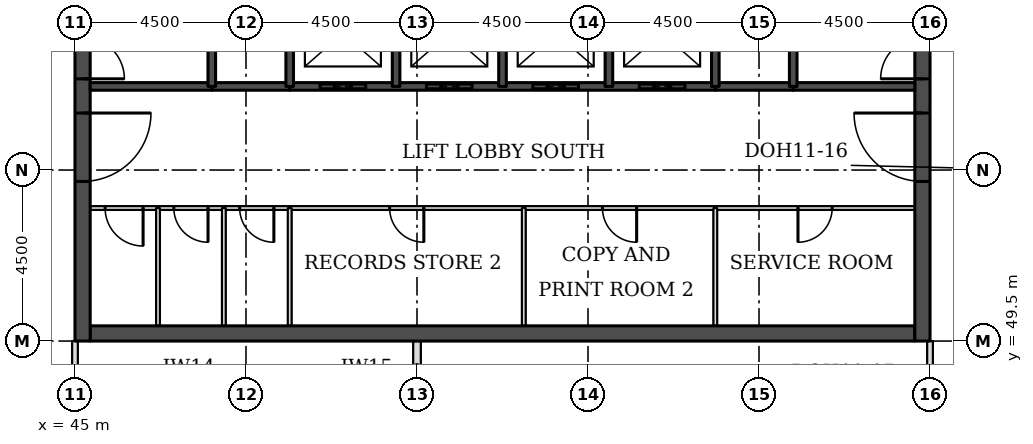
"""IFC4 building model, lengths in metres.
Left out: names, types, materials, properties, quantities, classifications, styles, units other than length and angle.
Written with IfcOpenShell. Run it as: python <this file> out.ifc"""

import sys

from ifc_helpers import new_model, si_unit, direction, frame, frame_2d, origin, place, context, subcontext, project, spatial, rectangle, extrude, element, fill, save


model = new_model("IFC4")
c1 = context("Model", 3, precision=1e-05, world=origin(), true_north=direction((0.0, 1.0)))
c2 = subcontext(c1, "Body", "Model", "MODEL_VIEW")
j1 = project(units=[si_unit("LENGTHUNIT", "METRE"), si_unit("PLANEANGLEUNIT", "RADIAN")], contexts=[c1])
p1 = place(None, origin())
s1 = spatial("IfcSite", under=j1, at=p1, CompositionType="ELEMENT")
p2 = place(p1, origin())
s2 = spatial("IfcBuilding", under=s1, at=p2, CompositionType="ELEMENT")
p3 = place(p2, frame((0.0, 0.0, 237.8)))
s3 = spatial("IfcBuildingStorey", under=s2, at=p3, CompositionType="ELEMENT", Elevation=237.8)
p4 = place(p3, frame((45.4, 49.7, 0.0), z_axis=(0.0, 0.0, 1.0), x_axis=(1.0, 0.0, 0.0)))
e1 = element("IfcWall", 1, at=p4, inside=s3, PredefinedType="SHEAR", context=c2, shape_type="SweptSolid", body=[
    extrude(rectangle(XDim=21.7, YDim=0.4, at=frame_2d((10.85, 0.0))), origin(), (0.0, 0.0, 1.0), 3.7),
])
p5 = place(p3, frame((45.2, 49.5, 0.0), z_axis=(0.0, 0.0, 1.0), x_axis=(0.0, 1.0, 0.0)))
e2 = element("IfcWall", 2, at=p5, inside=s3, PredefinedType="SHEAR", context=c2, shape_type="SweptSolid", body=[
    extrude(rectangle(XDim=22.5, YDim=0.4, at=frame_2d((11.25, 0.0))), origin(), (0.0, 0.0, 1.0), 3.7),
])
p6 = place(p5, frame((4.2, 0.0, 0.0)))
e3 = element("IfcOpeningElement", 3, at=p6, cuts=e2, PredefinedType="OPENING", context=c2, shape_type="SweptSolid", body=[
    extrude(rectangle(XDim=1.8, YDim=2.1, at=frame_2d((0.9, 1.05))), frame((0.0, 0.21, 0.0), z_axis=(0.0, -1.0, 0.0), x_axis=(1.0, 0.0, 0.0)), (0.0, 0.0, 1.0), 0.42),
])
p7 = place(p5, frame((6.9, 0.0, 0.0)))
e4 = element("IfcOpeningElement", 4, at=p7, cuts=e2, PredefinedType="OPENING", context=c2, shape_type="SweptSolid", body=[
    extrude(rectangle(XDim=1.1, YDim=2.1, at=frame_2d((0.55, 1.05))), frame((0.0, 0.21, 0.0), z_axis=(0.0, -1.0, 0.0), x_axis=(1.0, 0.0, 0.0)), (0.0, 0.0, 1.0), 0.42),
])
p8 = place(p5, frame((13.6, 0.0, 0.0)))
e5 = element("IfcOpeningElement", 5, at=p8, cuts=e2, PredefinedType="OPENING", context=c2, shape_type="SweptSolid", body=[
    extrude(rectangle(XDim=1.1, YDim=2.1, at=frame_2d((0.55, 1.05))), frame((0.0, 0.21, 0.0), z_axis=(0.0, -1.0, 0.0), x_axis=(1.0, 0.0, 0.0)), (0.0, 0.0, 1.0), 0.42),
])
p9 = place(p5, frame((16.5, 0.0, 0.0)))
e6 = element("IfcOpeningElement", 6, at=p9, cuts=e2, PredefinedType="OPENING", context=c2, shape_type="SweptSolid", body=[
    extrude(rectangle(XDim=1.8, YDim=2.1, at=frame_2d((0.9, 1.05))), frame((0.0, 0.21, 0.0), z_axis=(0.0, -1.0, 0.0), x_axis=(1.0, 0.0, 0.0)), (0.0, 0.0, 1.0), 0.42),
])
p10 = place(p3, frame((67.3, 49.5, 0.0), z_axis=(0.0, 0.0, 1.0), x_axis=(0.0, 1.0, 0.0)))
e7 = element("IfcWall", 7, at=p10, inside=s3, PredefinedType="SHEAR", context=c2, shape_type="SweptSolid", body=[
    extrude(rectangle(XDim=22.5, YDim=0.4, at=frame_2d((11.25, 0.0))), origin(), (0.0, 0.0, 1.0), 3.7),
])
p11 = place(p10, frame((4.2, 0.0, 0.0)))
e8 = element("IfcOpeningElement", 8, at=p11, cuts=e7, PredefinedType="OPENING", context=c2, shape_type="SweptSolid", body=[
    extrude(rectangle(XDim=1.8, YDim=2.1, at=frame_2d((0.9, 1.05))), frame((0.0, 0.21, 0.0), z_axis=(0.0, -1.0, 0.0), x_axis=(1.0, 0.0, 0.0)), (0.0, 0.0, 1.0), 0.42),
])
p12 = place(p10, frame((6.9, 0.0, 0.0)))
e9 = element("IfcOpeningElement", 9, at=p12, cuts=e7, PredefinedType="OPENING", context=c2, shape_type="SweptSolid", body=[
    extrude(rectangle(XDim=1.1, YDim=2.1, at=frame_2d((0.55, 1.05))), frame((0.0, 0.21, 0.0), z_axis=(0.0, -1.0, 0.0), x_axis=(1.0, 0.0, 0.0)), (0.0, 0.0, 1.0), 0.42),
])
p13 = place(p10, frame((13.6, 0.0, 0.0)))
e10 = element("IfcOpeningElement", 10, at=p13, cuts=e7, PredefinedType="OPENING", context=c2, shape_type="SweptSolid", body=[
    extrude(rectangle(XDim=1.1, YDim=2.1, at=frame_2d((0.55, 1.05))), frame((0.0, 0.21, 0.0), z_axis=(0.0, -1.0, 0.0), x_axis=(1.0, 0.0, 0.0)), (0.0, 0.0, 1.0), 0.42),
])
p14 = place(p10, frame((16.5, 0.0, 0.0)))
e11 = element("IfcOpeningElement", 11, at=p14, cuts=e7, PredefinedType="OPENING", context=c2, shape_type="SweptSolid", body=[
    extrude(rectangle(XDim=1.8, YDim=2.1, at=frame_2d((0.9, 1.05))), frame((0.0, 0.21, 0.0), z_axis=(0.0, -1.0, 0.0), x_axis=(1.0, 0.0, 0.0)), (0.0, 0.0, 1.0), 0.42),
])
p15 = place(p3, frame((54.0, 46.5, 0.0), z_axis=(0.0, 0.0, 1.0), x_axis=(0.0, 1.0, 0.0)))
e12 = element("IfcWall", 12, at=p15, inside=s3, PredefinedType="PARTITIONING", context=c2, shape_type="SweptSolid", body=[
    extrude(rectangle(XDim=3.0, YDim=0.2, at=frame_2d((1.5, 0.0))), origin(), (0.0, 0.0, 1.0), 3.55),
])
for number, where, z_axis, x_axis in (
    (13, (45.0, 48.0, 0.0), (0.0, 0.0, 1.0), (0.0, 1.0, 0.0)),
    (14, (67.5, 48.0, 0.0), (0.0, 0.0, 1.0), (0.0, 1.0, 0.0)),
):
    element("IfcWall", number, at=place(p3, frame(where, z_axis=z_axis, x_axis=x_axis)), inside=s3, PredefinedType="PARTITIONING", context=c2, shape_type="SweptSolid", body=[
        extrude(rectangle(XDim=1.5, YDim=0.15, at=frame_2d((0.75, 0.0))), origin(), (0.0, 0.0, 1.0), 3.022),
    ])
p16 = place(p3, frame((45.4, 53.0, 0.0), z_axis=(0.0, 0.0, 1.0), x_axis=(1.0, 0.0, 0.0)))
e15 = element("IfcWall", 15, at=p16, inside=s3, PredefinedType="PARTITIONING", context=c2, shape_type="SweptSolid", body=[
    extrude(rectangle(XDim=21.7, YDim=0.1, at=frame_2d((10.85, 0.0))), origin(), (0.0, 0.0, 1.0), 3.55),
])
p17 = place(p16, frame((18.625, 0.0, 0.0)))
e16 = element("IfcOpeningElement", 16, at=p17, cuts=e15, PredefinedType="OPENING", context=c2, shape_type="SweptSolid", body=[
    extrude(rectangle(XDim=0.9, YDim=2.1, at=frame_2d((0.45, 1.05))), frame((0.0, 0.06, 0.0), z_axis=(0.0, -1.0, 0.0), x_axis=(1.0, 0.0, 0.0)), (0.0, 0.0, 1.0), 0.12),
])
p18 = place(p16, frame((0.393, 0.0, 0.0)))
e17 = element("IfcOpeningElement", 17, at=p18, cuts=e15, PredefinedType="OPENING", context=c2, shape_type="SweptSolid", body=[
    extrude(rectangle(XDim=1.0, YDim=2.1, at=frame_2d((0.5, 1.05))), frame((0.0, 0.06, 0.0), z_axis=(0.0, -1.0, 0.0), x_axis=(1.0, 0.0, 0.0)), (0.0, 0.0, 1.0), 0.12),
])
p19 = place(p16, frame((2.201, 0.0, 0.0)))
e18 = element("IfcOpeningElement", 18, at=p19, cuts=e15, PredefinedType="OPENING", context=c2, shape_type="SweptSolid", body=[
    extrude(rectangle(XDim=0.9, YDim=2.1, at=frame_2d((0.45, 1.05))), frame((0.0, 0.06, 0.0), z_axis=(0.0, -1.0, 0.0), x_axis=(1.0, 0.0, 0.0)), (0.0, 0.0, 1.0), 0.12),
])
p20 = place(p16, frame((3.934, 0.0, 0.0)))
e19 = element("IfcOpeningElement", 19, at=p20, cuts=e15, PredefinedType="OPENING", context=c2, shape_type="SweptSolid", body=[
    extrude(rectangle(XDim=0.9, YDim=2.1, at=frame_2d((0.45, 1.05))), frame((0.0, 0.06, 0.0), z_axis=(0.0, -1.0, 0.0), x_axis=(1.0, 0.0, 0.0)), (0.0, 0.0, 1.0), 0.12),
])
p21 = place(p16, frame((7.88, 0.0, 0.0)))
e20 = element("IfcOpeningElement", 20, at=p21, cuts=e15, PredefinedType="OPENING", context=c2, shape_type="SweptSolid", body=[
    extrude(rectangle(XDim=0.9, YDim=2.1, at=frame_2d((0.45, 1.05))), frame((0.0, 0.06, 0.0), z_axis=(0.0, -1.0, 0.0), x_axis=(1.0, 0.0, 0.0)), (0.0, 0.0, 1.0), 0.12),
])
p22 = place(p16, frame((13.48, 0.0, 0.0)))
e21 = element("IfcOpeningElement", 21, at=p22, cuts=e15, PredefinedType="OPENING", context=c2, shape_type="SweptSolid", body=[
    extrude(rectangle(XDim=0.9, YDim=2.1, at=frame_2d((0.45, 1.05))), frame((0.0, 0.06, 0.0), z_axis=(0.0, -1.0, 0.0), x_axis=(1.0, 0.0, 0.0)), (0.0, 0.0, 1.0), 0.12),
])
for number, where, z_axis, x_axis in (
    (22, (48.6, 56.2, 0.0), (0.0, 0.0, 1.0), (1.0, 0.0, 0.0)),
    (23, (61.85, 56.2, 0.0), (0.0, 0.0, 1.0), (1.0, 0.0, 0.0)),
):
    element("IfcWall", number, at=place(p3, frame(where, z_axis=z_axis, x_axis=x_axis)), inside=s3, PredefinedType="SOLIDWALL", context=c2, shape_type="SweptSolid", body=[
        extrude(rectangle(XDim=2.05, YDim=0.2, at=frame_2d((1.025, 0.0))), origin(), (0.0, 0.0, 1.0), 3.55),
    ])
p23 = place(p3, frame((45.4, 56.2, 0.0), z_axis=(0.0, 0.0, 1.0), x_axis=(1.0, 0.0, 0.0)))
e24 = element("IfcWall", 24, at=p23, inside=s3, PredefinedType="SOLIDWALL", context=c2, shape_type="SweptSolid", body=[
    extrude(rectangle(XDim=3.2, YDim=0.2, at=frame_2d((1.6, 0.0))), origin(), (0.0, 0.0, 1.0), 3.55),
])
p24 = place(p3, frame((50.65, 56.2, 0.0), z_axis=(0.0, 0.0, 1.0), x_axis=(1.0, 0.0, 0.0)))
e25 = element("IfcWall", 25, at=p24, inside=s3, PredefinedType="SOLIDWALL", context=c2, shape_type="SweptSolid", body=[
    extrude(rectangle(XDim=11.2, YDim=0.2, at=frame_2d((5.6, 0.0))), origin(), (0.0, 0.0, 1.0), 3.55),
])
p25 = place(p24, frame((0.8, 0.0, 0.0)))
e26 = element("IfcOpeningElement", 26, at=p25, cuts=e25, PredefinedType="OPENING", context=c2, shape_type="SweptSolid", body=[
    extrude(rectangle(XDim=1.2, YDim=2.1, at=frame_2d((0.6, 1.05))), frame((0.0, 0.11, 0.0), z_axis=(0.0, -1.0, 0.0), x_axis=(1.0, 0.0, 0.0)), (0.0, 0.0, 1.0), 0.22),
])
p26 = place(p24, frame((3.6, 0.0, 0.0)))
e27 = element("IfcOpeningElement", 27, at=p26, cuts=e25, PredefinedType="OPENING", context=c2, shape_type="SweptSolid", body=[
    extrude(rectangle(XDim=1.2, YDim=2.1, at=frame_2d((0.6, 1.05))), frame((0.0, 0.11, 0.0), z_axis=(0.0, -1.0, 0.0), x_axis=(1.0, 0.0, 0.0)), (0.0, 0.0, 1.0), 0.22),
])
p27 = place(p24, frame((6.4, 0.0, 0.0)))
e28 = element("IfcOpeningElement", 28, at=p27, cuts=e25, PredefinedType="OPENING", context=c2, shape_type="SweptSolid", body=[
    extrude(rectangle(XDim=1.2, YDim=2.1, at=frame_2d((0.6, 1.05))), frame((0.0, 0.11, 0.0), z_axis=(0.0, -1.0, 0.0), x_axis=(1.0, 0.0, 0.0)), (0.0, 0.0, 1.0), 0.22),
])
p28 = place(p24, frame((9.2, 0.0, 0.0)))
e29 = element("IfcOpeningElement", 29, at=p28, cuts=e25, PredefinedType="OPENING", context=c2, shape_type="SweptSolid", body=[
    extrude(rectangle(XDim=1.2, YDim=2.1, at=frame_2d((0.6, 1.05))), frame((0.0, 0.11, 0.0), z_axis=(0.0, -1.0, 0.0), x_axis=(1.0, 0.0, 0.0)), (0.0, 0.0, 1.0), 0.22),
])
p29 = place(p3, frame((63.9, 56.2, 0.0), z_axis=(0.0, 0.0, 1.0), x_axis=(1.0, 0.0, 0.0)))
e30 = element("IfcWall", 30, at=p29, inside=s3, PredefinedType="SOLIDWALL", context=c2, shape_type="SweptSolid", body=[
    extrude(rectangle(XDim=3.2, YDim=0.2, at=frame_2d((1.6, 0.0))), origin(), (0.0, 0.0, 1.0), 3.55),
])
p30 = place(p3, frame((47.185, 49.9, 0.0), z_axis=(0.0, 0.0, 1.0), x_axis=(0.0, 1.0, 0.0)))
e31 = element("IfcWall", 31, at=p30, inside=s3, PredefinedType="PARTITIONING", context=c2, shape_type="SweptSolid", body=[
    extrude(rectangle(XDim=3.1, YDim=0.1, at=frame_2d((1.55, 0.0))), origin(), (0.0, 0.0, 1.0), 3.55),
])
p31 = place(p3, frame((48.6, 56.2, 0.0), z_axis=(0.0, 0.0, 1.0), x_axis=(0.0, 1.0, 0.0)))
e32 = element("IfcWall", 32, at=p31, inside=s3, PredefinedType="SOLIDWALL", context=c2, shape_type="SweptSolid", body=[
    extrude(rectangle(XDim=5.8, YDim=0.2, at=frame_2d((2.9, 0.0))), origin(), (0.0, 0.0, 1.0), 3.55),
])
for number, where, z_axis, x_axis in (
    (33, (48.917, 49.9, 0.0), (0.0, 0.0, 1.0), (0.0, 1.0, 0.0)),
    (34, (50.65, 49.9, 0.0), (0.0, 0.0, 1.0), (0.0, 1.0, 0.0)),
):
    element("IfcWall", number, at=place(p3, frame(where, z_axis=z_axis, x_axis=x_axis)), inside=s3, PredefinedType="PARTITIONING", context=c2, shape_type="SweptSolid", body=[
        extrude(rectangle(XDim=3.1, YDim=0.1, at=frame_2d((1.55, 0.0))), origin(), (0.0, 0.0, 1.0), 3.55),
    ])
for number, where, z_axis, x_axis in (
    (35, (50.65, 56.2, 0.0), (0.0, 0.0, 1.0), (0.0, 1.0, 0.0)),
    (36, (53.45, 56.2, 0.0), (0.0, 0.0, 1.0), (0.0, 1.0, 0.0)),
    (37, (56.25, 56.2, 0.0), (0.0, 0.0, 1.0), (0.0, 1.0, 0.0)),
):
    element("IfcWall", number, at=place(p3, frame(where, z_axis=z_axis, x_axis=x_axis)), inside=s3, PredefinedType="SOLIDWALL", context=c2, shape_type="SweptSolid", body=[
        extrude(rectangle(XDim=2.8, YDim=0.2, at=frame_2d((1.4, 0.0))), origin(), (0.0, 0.0, 1.0), 3.55),
    ])
p32 = place(p3, frame((56.81, 49.9, 0.0), z_axis=(0.0, 0.0, 1.0), x_axis=(0.0, 1.0, 0.0)))
e38 = element("IfcWall", 38, at=p32, inside=s3, PredefinedType="PARTITIONING", context=c2, shape_type="SweptSolid", body=[
    extrude(rectangle(XDim=3.1, YDim=0.1, at=frame_2d((1.55, 0.0))), origin(), (0.0, 0.0, 1.0), 3.55),
])
p33 = place(p3, frame((59.05, 56.2, 0.0), z_axis=(0.0, 0.0, 1.0), x_axis=(0.0, 1.0, 0.0)))
e39 = element("IfcWall", 39, at=p33, inside=s3, PredefinedType="SOLIDWALL", context=c2, shape_type="SweptSolid", body=[
    extrude(rectangle(XDim=2.8, YDim=0.2, at=frame_2d((1.4, 0.0))), origin(), (0.0, 0.0, 1.0), 3.55),
])
p34 = place(p3, frame((61.85, 49.9, 0.0), z_axis=(0.0, 0.0, 1.0), x_axis=(0.0, 1.0, 0.0)))
e40 = element("IfcWall", 40, at=p34, inside=s3, PredefinedType="PARTITIONING", context=c2, shape_type="SweptSolid", body=[
    extrude(rectangle(XDim=3.1, YDim=0.1, at=frame_2d((1.55, 0.0))), origin(), (0.0, 0.0, 1.0), 3.55),
])
p35 = place(p3, frame((61.85, 56.2, 0.0), z_axis=(0.0, 0.0, 1.0), x_axis=(0.0, 1.0, 0.0)))
e41 = element("IfcWall", 41, at=p35, inside=s3, PredefinedType="SOLIDWALL", context=c2, shape_type="SweptSolid", body=[
    extrude(rectangle(XDim=2.8, YDim=0.2, at=frame_2d((1.4, 0.0))), origin(), (0.0, 0.0, 1.0), 3.55),
])
p36 = place(p3, frame((63.9, 56.2, 0.0), z_axis=(0.0, 0.0, 1.0), x_axis=(0.0, 1.0, 0.0)))
e42 = element("IfcWall", 42, at=p36, inside=s3, PredefinedType="SOLIDWALL", context=c2, shape_type="SweptSolid", body=[
    extrude(rectangle(XDim=5.8, YDim=0.2, at=frame_2d((2.9, 0.0))), origin(), (0.0, 0.0, 1.0), 3.55),
])
p37 = place(p25, origin())
e43 = element("IfcDoor", 43, at=p37, inside=s3, OperationType="DOUBLE_DOOR_SLIDING", PredefinedType="DOOR", context=c2, shape_type="SweptSolid", body=[
    extrude(rectangle(XDim=1.2, YDim=2.1, at=frame_2d((0.6, 1.05))), frame((0.0, 0.025, 0.0), z_axis=(0.0, -1.0, 0.0), x_axis=(1.0, 0.0, 0.0)), (0.0, 0.0, 1.0), 0.05),
])
fill(e26, e43)
p38 = place(p26, origin())
e44 = element("IfcDoor", 44, at=p38, inside=s3, OperationType="DOUBLE_DOOR_SLIDING", PredefinedType="DOOR", context=c2, shape_type="SweptSolid", body=[
    extrude(rectangle(XDim=1.2, YDim=2.1, at=frame_2d((0.6, 1.05))), frame((0.0, 0.025, 0.0), z_axis=(0.0, -1.0, 0.0), x_axis=(1.0, 0.0, 0.0)), (0.0, 0.0, 1.0), 0.05),
])
fill(e27, e44)
p39 = place(p27, origin())
e45 = element("IfcDoor", 45, at=p39, inside=s3, OperationType="DOUBLE_DOOR_SLIDING", PredefinedType="DOOR", context=c2, shape_type="SweptSolid", body=[
    extrude(rectangle(XDim=1.2, YDim=2.1, at=frame_2d((0.6, 1.05))), frame((0.0, 0.025, 0.0), z_axis=(0.0, -1.0, 0.0), x_axis=(1.0, 0.0, 0.0)), (0.0, 0.0, 1.0), 0.05),
])
fill(e28, e45)
p40 = place(p28, origin())
e46 = element("IfcDoor", 46, at=p40, inside=s3, OperationType="DOUBLE_DOOR_SLIDING", PredefinedType="DOOR", context=c2, shape_type="SweptSolid", body=[
    extrude(rectangle(XDim=1.2, YDim=2.1, at=frame_2d((0.6, 1.05))), frame((0.0, 0.025, 0.0), z_axis=(0.0, -1.0, 0.0), x_axis=(1.0, 0.0, 0.0)), (0.0, 0.0, 1.0), 0.05),
])
fill(e29, e46)
p41 = place(p6, frame((1.8, 0.0, 0.0), z_axis=(0.0, 0.0, 1.0), x_axis=(-1.0, 0.0, 0.0)))
e47 = element("IfcDoor", 47, at=p41, inside=s3, OperationType="SINGLE_SWING_LEFT", PredefinedType="DOOR", context=c2, shape_type="SweptSolid", body=[
    extrude(rectangle(XDim=1.8, YDim=2.1, at=frame_2d((0.9, 1.05))), frame((0.0, 0.025, 0.0), z_axis=(0.0, -1.0, 0.0), x_axis=(1.0, 0.0, 0.0)), (0.0, 0.0, 1.0), 0.05),
])
fill(e3, e47)
p42 = place(p7, frame((1.1, 0.0, 0.0), z_axis=(0.0, 0.0, 1.0), x_axis=(-1.0, 0.0, 0.0)))
e48 = element("IfcDoor", 48, at=p42, inside=s3, OperationType="SINGLE_SWING_RIGHT", PredefinedType="DOOR", context=c2, shape_type="SweptSolid", body=[
    extrude(rectangle(XDim=1.1, YDim=2.1, at=frame_2d((0.55, 1.05))), frame((0.0, 0.025, 0.0), z_axis=(0.0, -1.0, 0.0), x_axis=(1.0, 0.0, 0.0)), (0.0, 0.0, 1.0), 0.05),
])
fill(e4, e48)
p43 = place(p11, origin())
e49 = element("IfcDoor", 49, at=p43, inside=s3, OperationType="SINGLE_SWING_RIGHT", PredefinedType="DOOR", context=c2, shape_type="SweptSolid", body=[
    extrude(rectangle(XDim=1.8, YDim=2.1, at=frame_2d((0.9, 1.05))), frame((0.0, 0.025, 0.0), z_axis=(0.0, -1.0, 0.0), x_axis=(1.0, 0.0, 0.0)), (0.0, 0.0, 1.0), 0.05),
])
fill(e8, e49)
p44 = place(p12, origin())
e50 = element("IfcDoor", 50, at=p44, inside=s3, OperationType="SINGLE_SWING_LEFT", PredefinedType="DOOR", context=c2, shape_type="SweptSolid", body=[
    extrude(rectangle(XDim=1.1, YDim=2.1, at=frame_2d((0.55, 1.05))), frame((0.0, 0.025, 0.0), z_axis=(0.0, -1.0, 0.0), x_axis=(1.0, 0.0, 0.0)), (0.0, 0.0, 1.0), 0.05),
])
fill(e9, e50)
p45 = place(p17, frame((0.9, 0.0, 0.0), z_axis=(0.0, 0.0, 1.0), x_axis=(-1.0, 0.0, 0.0)))
e51 = element("IfcDoor", 51, at=p45, inside=s3, OperationType="SINGLE_SWING_RIGHT", PredefinedType="DOOR", context=c2, shape_type="SweptSolid", body=[
    extrude(rectangle(XDim=0.9, YDim=2.1, at=frame_2d((0.45, 1.05))), frame((0.0, 0.025, 0.0), z_axis=(0.0, -1.0, 0.0), x_axis=(1.0, 0.0, 0.0)), (0.0, 0.0, 1.0), 0.05),
])
fill(e16, e51)
p46 = place(p18, frame((1.0, 0.0, 0.0), z_axis=(0.0, 0.0, 1.0), x_axis=(-1.0, 0.0, 0.0)))
e52 = element("IfcDoor", 52, at=p46, inside=s3, OperationType="SINGLE_SWING_LEFT", PredefinedType="DOOR", context=c2, shape_type="SweptSolid", body=[
    extrude(rectangle(XDim=1.0, YDim=2.1, at=frame_2d((0.5, 1.05))), frame((0.0, 0.025, 0.0), z_axis=(0.0, -1.0, 0.0), x_axis=(1.0, 0.0, 0.0)), (0.0, 0.0, 1.0), 0.05),
])
fill(e17, e52)
p47 = place(p19, frame((0.9, 0.0, 0.0), z_axis=(0.0, 0.0, 1.0), x_axis=(-1.0, 0.0, 0.0)))
e53 = element("IfcDoor", 53, at=p47, inside=s3, OperationType="SINGLE_SWING_LEFT", PredefinedType="DOOR", context=c2, shape_type="SweptSolid", body=[
    extrude(rectangle(XDim=0.9, YDim=2.1, at=frame_2d((0.45, 1.05))), frame((0.0, 0.025, 0.0), z_axis=(0.0, -1.0, 0.0), x_axis=(1.0, 0.0, 0.0)), (0.0, 0.0, 1.0), 0.05),
])
fill(e18, e53)
p48 = place(p20, frame((0.9, 0.0, 0.0), z_axis=(0.0, 0.0, 1.0), x_axis=(-1.0, 0.0, 0.0)))
e54 = element("IfcDoor", 54, at=p48, inside=s3, OperationType="SINGLE_SWING_LEFT", PredefinedType="DOOR", context=c2, shape_type="SweptSolid", body=[
    extrude(rectangle(XDim=0.9, YDim=2.1, at=frame_2d((0.45, 1.05))), frame((0.0, 0.025, 0.0), z_axis=(0.0, -1.0, 0.0), x_axis=(1.0, 0.0, 0.0)), (0.0, 0.0, 1.0), 0.05),
])
fill(e19, e54)
p49 = place(p21, frame((0.9, 0.0, 0.0), z_axis=(0.0, 0.0, 1.0), x_axis=(-1.0, 0.0, 0.0)))
e55 = element("IfcDoor", 55, at=p49, inside=s3, OperationType="SINGLE_SWING_LEFT", PredefinedType="DOOR", context=c2, shape_type="SweptSolid", body=[
    extrude(rectangle(XDim=0.9, YDim=2.1, at=frame_2d((0.45, 1.05))), frame((0.0, 0.025, 0.0), z_axis=(0.0, -1.0, 0.0), x_axis=(1.0, 0.0, 0.0)), (0.0, 0.0, 1.0), 0.05),
])
fill(e20, e55)
p50 = place(p22, frame((0.9, 0.0, 0.0), z_axis=(0.0, 0.0, 1.0), x_axis=(-1.0, 0.0, 0.0)))
e56 = element("IfcDoor", 56, at=p50, inside=s3, OperationType="SINGLE_SWING_LEFT", PredefinedType="DOOR", context=c2, shape_type="SweptSolid", body=[
    extrude(rectangle(XDim=0.9, YDim=2.1, at=frame_2d((0.45, 1.05))), frame((0.0, 0.025, 0.0), z_axis=(0.0, -1.0, 0.0), x_axis=(1.0, 0.0, 0.0)), (0.0, 0.0, 1.0), 0.05),
])
fill(e21, e56)
save(model, sys.argv[1])
